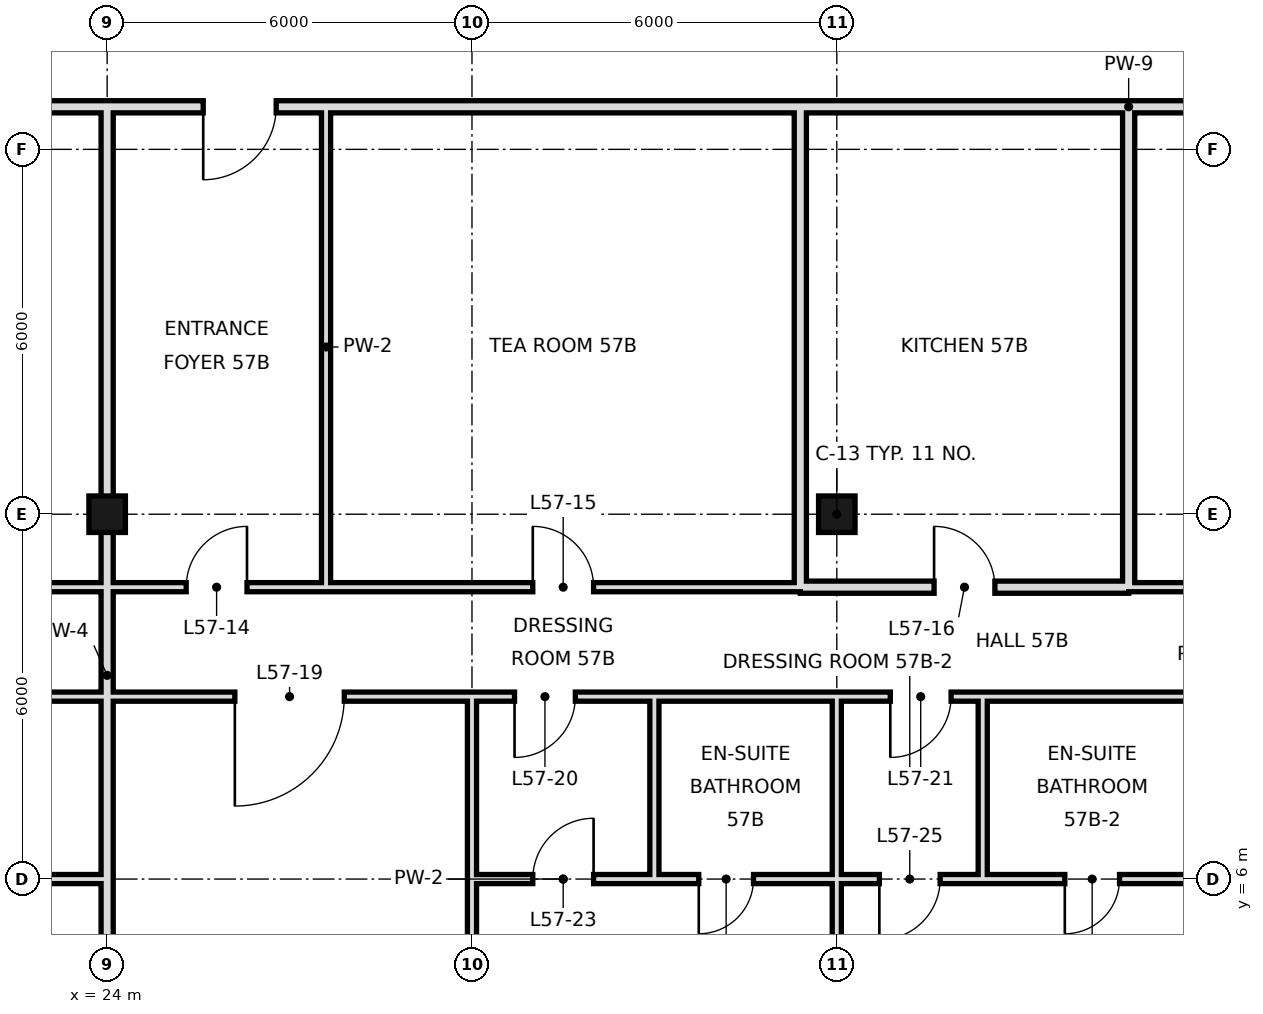
"""IFC4 building model, lengths in metres.
Left out: names, types, materials, properties, quantities, classifications, styles, units other than length and angle.
Written with IfcOpenShell. Run it as: python <this file> out.ifc"""

import sys

from ifc_helpers import new_model, si_unit, direction, frame, frame_2d, origin, origin_2d, place, context, subcontext, project, spatial, rectangle, hollow_rectangle, extrude, element, fill, save


model = new_model("IFC4")
c1 = context("Model", 3, precision=1e-05, world=origin(), true_north=direction((0.0, 1.0)))
c2 = subcontext(c1, "Body", "Model", "MODEL_VIEW")
j1 = project(units=[si_unit("LENGTHUNIT", "METRE"), si_unit("PLANEANGLEUNIT", "RADIAN")], contexts=[c1])
p1 = place(None, origin())
s1 = spatial("IfcSite", under=j1, at=p1, CompositionType="ELEMENT")
p2 = place(p1, origin())
s2 = spatial("IfcBuilding", under=s1, at=p2, CompositionType="ELEMENT")
p3 = place(p2, frame((0.0, 0.0, 243.2)))
s3 = spatial("IfcBuildingStorey", under=s2, at=p3, CompositionType="ELEMENT", Elevation=243.2)
for number, where, z_axis, x_axis in (
    (1, (24.0, 12.0, 0.0), (0.0, 0.0, 1.0), (1.0, 0.0, 0.0)),
    (2, (36.0, 12.0, 0.0), (0.0, 0.0, 1.0), (1.0, 0.0, 0.0)),
):
    element("IfcColumn", number, at=place(p3, frame(where, z_axis=z_axis, x_axis=x_axis)), inside=s3, PredefinedType="COLUMN", context=c2, shape_type="SweptSolid", body=[
        extrude(hollow_rectangle(XDim=0.6, YDim=0.6, WallThickness=0.028, at=origin_2d()), origin(), (0.0, 0.0, 1.0), 3.6),
    ])
p4 = place(p3, frame((24.0, 0.0, 0.0), z_axis=(0.0, 0.0, 1.0), x_axis=(0.0, 1.0, 0.0)))
e3 = element("IfcWall", 3, at=p4, inside=s3, PredefinedType="SOLIDWALL", context=c2, shape_type="SweptSolid", body=[
    extrude(rectangle(XDim=18.7, YDim=0.2, at=frame_2d((9.35, 0.0))), origin(), (0.0, 0.0, 1.0), 2.72),
])
p5 = place(p3, frame((27.6, 10.8, 0.0), z_axis=(0.0, 0.0, 1.0), x_axis=(0.0, 1.0, 0.0)))
e4 = element("IfcWall", 4, at=p5, inside=s3, PredefinedType="PARTITIONING", context=c2, shape_type="SweptSolid", body=[
    extrude(rectangle(XDim=7.9, YDim=0.15, at=frame_2d((3.95, 0.0))), origin(), (0.0, 0.0, 1.0), 3.42),
])
p6 = place(p3, frame((30.0, -0.6, 0.0), z_axis=(0.0, 0.0, 1.0), x_axis=(0.0, 1.0, 0.0)))
e5 = element("IfcWall", 5, at=p6, inside=s3, PredefinedType="PARTITIONING", context=c2, shape_type="SweptSolid", body=[
    extrude(rectangle(XDim=9.6, YDim=0.15, at=frame_2d((4.8, 0.0))), origin(), (0.0, 0.0, 1.0), 2.72),
])
p7 = place(p3, frame((33.0, 6.0, 0.0), z_axis=(0.0, 0.0, 1.0), x_axis=(0.0, 1.0, 0.0)))
e6 = element("IfcWall", 6, at=p7, inside=s3, PredefinedType="PARTITIONING", context=c2, shape_type="SweptSolid", body=[
    extrude(rectangle(XDim=3.0, YDim=0.15, at=frame_2d((1.5, 0.0))), origin(), (0.0, 0.0, 1.0), 3.42),
])
p8 = place(p3, frame((35.4, 10.8, 0.0), z_axis=(0.0, 0.0, 1.0), x_axis=(0.0, 1.0, 0.0)))
e7 = element("IfcWall", 7, at=p8, inside=s3, PredefinedType="SOLIDWALL", context=c2, shape_type="SweptSolid", body=[
    extrude(rectangle(XDim=7.9, YDim=0.2, at=frame_2d((3.95, 0.0))), origin(), (0.0, 0.0, 1.0), 2.72),
])
p9 = place(p3, frame((36.0, 0.0, 0.0), z_axis=(0.0, 0.0, 1.0), x_axis=(0.0, 1.0, 0.0)))
e8 = element("IfcWall", 8, at=p9, inside=s3, PredefinedType="PARTITIONING", context=c2, shape_type="SweptSolid", body=[
    extrude(rectangle(XDim=6.0, YDim=0.15, at=frame_2d((3.0, 0.0))), origin(), (0.0, 0.0, 1.0), 2.72),
])
p10 = place(p3, frame((36.0, 6.0, 0.0), z_axis=(0.0, 0.0, 1.0), x_axis=(0.0, 1.0, 0.0)))
e9 = element("IfcWall", 9, at=p10, inside=s3, PredefinedType="PARTITIONING", context=c2, shape_type="SweptSolid", body=[
    extrude(rectangle(XDim=3.0, YDim=0.15, at=frame_2d((1.5, 0.0))), origin(), (0.0, 0.0, 1.0), 2.72),
])
p11 = place(p3, frame((38.4, 6.0, 0.0), z_axis=(0.0, 0.0, 1.0), x_axis=(0.0, 1.0, 0.0)))
e10 = element("IfcWall", 10, at=p11, inside=s3, PredefinedType="PARTITIONING", context=c2, shape_type="SweptSolid", body=[
    extrude(rectangle(XDim=3.0, YDim=0.15, at=frame_2d((1.5, 0.0))), origin(), (0.0, 0.0, 1.0), 3.42),
])
p12 = place(p3, frame((40.8, 10.8, 0.0), z_axis=(0.0, 0.0, 1.0), x_axis=(0.0, 1.0, 0.0)))
e11 = element("IfcWall", 11, at=p12, inside=s3, PredefinedType="SOLIDWALL", context=c2, shape_type="SweptSolid", body=[
    extrude(rectangle(XDim=7.9, YDim=0.2, at=frame_2d((3.95, 0.0))), origin(), (0.0, 0.0, 1.0), 2.72),
])
p13 = place(p3, frame((35.4, 10.8, 0.0), z_axis=(0.0, 0.0, 1.0), x_axis=(1.0, 0.0, 0.0)))
e12 = element("IfcWall", 12, at=p13, inside=s3, PredefinedType="SOLIDWALL", context=c2, shape_type="SweptSolid", body=[
    extrude(rectangle(XDim=5.4, YDim=0.2, at=frame_2d((2.7, 0.0))), origin(), (0.0, 0.0, 1.0), 2.72),
])
p14 = place(p13, frame((2.2, 0.0, 0.0)))
e13 = element("IfcOpeningElement", 13, at=p14, cuts=e12, PredefinedType="OPENING", context=c2, shape_type="SweptSolid", body=[
    extrude(rectangle(XDim=1.0, YDim=2.4, at=frame_2d((0.5, 1.2))), frame((0.0, 0.11, 0.0), z_axis=(0.0, -1.0, 0.0), x_axis=(1.0, 0.0, 0.0)), (0.0, 0.0, 1.0), 0.22),
])
p15 = place(p3, frame((6.0, 10.8, 0.0), z_axis=(0.0, 0.0, 1.0), x_axis=(1.0, 0.0, 0.0)))
e14 = element("IfcWall", 14, at=p15, inside=s3, PredefinedType="PARTITIONING", context=c2, shape_type="SweptSolid", body=[
    extrude(rectangle(XDim=29.4, YDim=0.15, at=frame_2d((14.7, 0.0))), origin(), (0.0, 0.0, 1.0), 3.42),
])
p16 = place(p15, frame((3.4, 0.0, 0.0)))
e15 = element("IfcOpeningElement", 15, at=p16, cuts=e14, PredefinedType="OPENING", context=c2, shape_type="SweptSolid", body=[
    extrude(rectangle(XDim=1.0, YDim=2.4, at=frame_2d((0.5, 1.2))), frame((0.0, 0.085, 0.0), z_axis=(0.0, -1.0, 0.0), x_axis=(1.0, 0.0, 0.0)), (0.0, 0.0, 1.0), 0.17),
])
p17 = place(p15, frame((9.4, 0.0, 0.0)))
e16 = element("IfcOpeningElement", 16, at=p17, cuts=e14, PredefinedType="OPENING", context=c2, shape_type="SweptSolid", body=[
    extrude(rectangle(XDim=1.0, YDim=2.4, at=frame_2d((0.5, 1.2))), frame((0.0, 0.085, 0.0), z_axis=(0.0, -1.0, 0.0), x_axis=(1.0, 0.0, 0.0)), (0.0, 0.0, 1.0), 0.17),
])
p18 = place(p15, frame((19.3, 0.0, 0.0)))
e17 = element("IfcOpeningElement", 17, at=p18, cuts=e14, PredefinedType="OPENING", context=c2, shape_type="SweptSolid", body=[
    extrude(rectangle(XDim=1.0, YDim=2.4, at=frame_2d((0.5, 1.2))), frame((0.0, 0.085, 0.0), z_axis=(0.0, -1.0, 0.0), x_axis=(1.0, 0.0, 0.0)), (0.0, 0.0, 1.0), 0.17),
])
p19 = place(p15, frame((25.0, 0.0, 0.0)))
e18 = element("IfcOpeningElement", 18, at=p19, cuts=e14, PredefinedType="OPENING", context=c2, shape_type="SweptSolid", body=[
    extrude(rectangle(XDim=1.0, YDim=2.4, at=frame_2d((0.5, 1.2))), frame((0.0, 0.085, 0.0), z_axis=(0.0, -1.0, 0.0), x_axis=(1.0, 0.0, 0.0)), (0.0, 0.0, 1.0), 0.17),
])
p20 = place(p3, frame((40.8, 10.8, 0.0), z_axis=(0.0, 0.0, 1.0), x_axis=(1.0, 0.0, 0.0)))
e19 = element("IfcWall", 19, at=p20, inside=s3, PredefinedType="PARTITIONING", context=c2, shape_type="SweptSolid", body=[
    extrude(rectangle(XDim=10.8, YDim=0.15, at=frame_2d((5.4, 0.0))), origin(), (0.0, 0.0, 1.0), 3.42),
])
p21 = place(p20, frame((4.9, 0.0, 0.0)))
e20 = element("IfcOpeningElement", 20, at=p21, cuts=e19, PredefinedType="OPENING", context=c2, shape_type="SweptSolid", body=[
    extrude(rectangle(XDim=1.0, YDim=2.4, at=frame_2d((0.5, 1.2))), frame((0.0, 0.085, 0.0), z_axis=(0.0, -1.0, 0.0), x_axis=(1.0, 0.0, 0.0)), (0.0, 0.0, 1.0), 0.17),
])
p22 = place(p3, frame((6.0, 18.7, 0.0), z_axis=(0.0, 0.0, 1.0), x_axis=(1.0, 0.0, 0.0)))
e21 = element("IfcWall", 21, at=p22, inside=s3, PredefinedType="SOLIDWALL", context=c2, shape_type="SweptSolid", body=[
    extrude(rectangle(XDim=29.4, YDim=0.2, at=frame_2d((14.7, 0.0))), origin(), (0.0, 0.0, 1.0), 2.72),
])
p23 = place(p22, frame((1.54, 0.0, 0.0)))
e22 = element("IfcOpeningElement", 22, at=p23, cuts=e21, PredefinedType="OPENING", context=c2, shape_type="SweptSolid", body=[
    extrude(rectangle(XDim=1.2, YDim=2.4, at=frame_2d((0.6, 1.2))), frame((0.0, 0.11, 0.0), z_axis=(0.0, -1.0, 0.0), x_axis=(1.0, 0.0, 0.0)), (0.0, 0.0, 1.0), 0.22),
])
p24 = place(p22, frame((19.58, 0.0, 0.0)))
e23 = element("IfcOpeningElement", 23, at=p24, cuts=e21, PredefinedType="OPENING", context=c2, shape_type="SweptSolid", body=[
    extrude(rectangle(XDim=1.2, YDim=2.4, at=frame_2d((0.6, 1.2))), frame((0.0, 0.11, 0.0), z_axis=(0.0, -1.0, 0.0), x_axis=(1.0, 0.0, 0.0)), (0.0, 0.0, 1.0), 0.22),
])
p25 = place(p3, frame((40.8, 18.7, 0.0), z_axis=(0.0, 0.0, 1.0), x_axis=(1.0, 0.0, 0.0)))
e24 = element("IfcWall", 24, at=p25, inside=s3, PredefinedType="SOLIDWALL", context=c2, shape_type="SweptSolid", body=[
    extrude(rectangle(XDim=4.1, YDim=0.2, at=frame_2d((2.05, 0.0))), origin(), (0.0, 0.0, 1.0), 2.72),
])
p26 = place(p3, frame((35.4, 18.7, 0.0), z_axis=(0.0, 0.0, 1.0), x_axis=(1.0, 0.0, 0.0)))
e25 = element("IfcWall", 25, at=p26, inside=s3, PredefinedType="SOLIDWALL", context=c2, shape_type="SweptSolid", body=[
    extrude(rectangle(XDim=5.4, YDim=0.2, at=frame_2d((2.7, 0.0))), origin(), (0.0, 0.0, 1.0), 3.42),
])
p27 = place(p3, frame((12.0, 6.0, 0.0), z_axis=(0.0, 0.0, 1.0), x_axis=(1.0, 0.0, 0.0)))
e26 = element("IfcWall", 26, at=p27, inside=s3, PredefinedType="PARTITIONING", context=c2, shape_type="SweptSolid", body=[
    extrude(rectangle(XDim=12.0, YDim=0.15, at=frame_2d((6.0, 0.0))), origin(), (0.0, 0.0, 1.0), 2.97),
])
p28 = place(p27, frame((0.25, 0.0, 0.0)))
e27 = element("IfcOpeningElement", 27, at=p28, cuts=e26, PredefinedType="OPENING", context=c2, shape_type="SweptSolid", body=[
    extrude(rectangle(XDim=1.8, YDim=2.4, at=frame_2d((0.9, 1.2))), frame((0.0, 0.085, 0.0), z_axis=(0.0, -1.0, 0.0), x_axis=(1.0, 0.0, 0.0)), (0.0, 0.0, 1.0), 0.17),
])
p29 = place(p3, frame((30.0, 6.0, 0.0), z_axis=(0.0, 0.0, 1.0), x_axis=(1.0, 0.0, 0.0)))
e28 = element("IfcWall", 28, at=p29, inside=s3, PredefinedType="PARTITIONING", context=c2, shape_type="SweptSolid", body=[
    extrude(rectangle(XDim=3.0, YDim=0.15, at=frame_2d((1.5, 0.0))), origin(), (0.0, 0.0, 1.0), 2.97),
])
p30 = place(p29, frame((1.0, 0.0, 0.0)))
e29 = element("IfcOpeningElement", 29, at=p30, cuts=e28, PredefinedType="OPENING", context=c2, shape_type="SweptSolid", body=[
    extrude(rectangle(XDim=1.0, YDim=2.4, at=frame_2d((0.5, 1.2))), frame((0.0, 0.085, 0.0), z_axis=(0.0, -1.0, 0.0), x_axis=(1.0, 0.0, 0.0)), (0.0, 0.0, 1.0), 0.17),
])
p31 = place(p3, frame((36.0, 6.0, 0.0), z_axis=(0.0, 0.0, 1.0), x_axis=(1.0, 0.0, 0.0)))
e30 = element("IfcWall", 30, at=p31, inside=s3, PredefinedType="PARTITIONING", context=c2, shape_type="SweptSolid", body=[
    extrude(rectangle(XDim=2.4, YDim=0.15, at=frame_2d((1.2, 0.0))), origin(), (0.0, 0.0, 1.0), 2.97),
])
p32 = place(p31, frame((0.7, 0.0, 0.0)))
e31 = element("IfcOpeningElement", 31, at=p32, cuts=e30, PredefinedType="OPENING", context=c2, shape_type="SweptSolid", body=[
    extrude(rectangle(XDim=1.0, YDim=2.4, at=frame_2d((0.5, 1.2))), frame((0.0, 0.085, 0.0), z_axis=(0.0, -1.0, 0.0), x_axis=(1.0, 0.0, 0.0)), (0.0, 0.0, 1.0), 0.17),
])
p33 = place(p3, frame((33.0, 6.0, 0.0), z_axis=(0.0, 0.0, 1.0), x_axis=(1.0, 0.0, 0.0)))
e32 = element("IfcWall", 32, at=p33, inside=s3, PredefinedType="PARTITIONING", context=c2, shape_type="SweptSolid", body=[
    extrude(rectangle(XDim=3.0, YDim=0.15, at=frame_2d((1.5, 0.0))), origin(), (0.0, 0.0, 1.0), 2.97),
])
p34 = place(p33, frame((0.73, 0.0, 0.0)))
e33 = element("IfcOpeningElement", 33, at=p34, cuts=e32, PredefinedType="OPENING", context=c2, shape_type="SweptSolid", body=[
    extrude(rectangle(XDim=0.9, YDim=2.4, at=frame_2d((0.45, 1.2))), frame((0.0, 0.085, 0.0), z_axis=(0.0, -1.0, 0.0), x_axis=(1.0, 0.0, 0.0)), (0.0, 0.0, 1.0), 0.17),
])
p35 = place(p3, frame((38.4, 6.0, 0.0), z_axis=(0.0, 0.0, 1.0), x_axis=(1.0, 0.0, 0.0)))
e34 = element("IfcWall", 34, at=p35, inside=s3, PredefinedType="PARTITIONING", context=c2, shape_type="SweptSolid", body=[
    extrude(rectangle(XDim=3.6, YDim=0.15, at=frame_2d((1.8, 0.0))), origin(), (0.0, 0.0, 1.0), 2.97),
])
p36 = place(p35, frame((1.35, 0.0, 0.0)))
e35 = element("IfcOpeningElement", 35, at=p36, cuts=e34, PredefinedType="OPENING", context=c2, shape_type="SweptSolid", body=[
    extrude(rectangle(XDim=0.9, YDim=2.4, at=frame_2d((0.45, 1.2))), frame((0.0, 0.085, 0.0), z_axis=(0.0, -1.0, 0.0), x_axis=(1.0, 0.0, 0.0)), (0.0, 0.0, 1.0), 0.17),
])
p37 = place(p3, frame((0.0, 9.0, 0.0), z_axis=(0.0, 0.0, 1.0), x_axis=(1.0, 0.0, 0.0)))
e36 = element("IfcWall", 36, at=p37, inside=s3, PredefinedType="PARTITIONING", context=c2, shape_type="SweptSolid", body=[
    extrude(rectangle(XDim=33.0, YDim=0.15, at=frame_2d((16.5, 0.0))), origin(), (0.0, 0.0, 1.0), 3.42),
])
p38 = place(p37, frame((1.6, 0.0, 0.0)))
e37 = element("IfcOpeningElement", 37, at=p38, cuts=e36, PredefinedType="OPENING", context=c2, shape_type="SweptSolid", body=[
    extrude(rectangle(XDim=1.0, YDim=2.4, at=frame_2d((0.5, 1.2))), frame((0.0, 0.085, 0.0), z_axis=(0.0, -1.0, 0.0), x_axis=(1.0, 0.0, 0.0)), (0.0, 0.0, 1.0), 0.17),
])
p39 = place(p37, frame((9.4, 0.0, 0.0)))
e38 = element("IfcOpeningElement", 38, at=p39, cuts=e36, PredefinedType="OPENING", context=c2, shape_type="SweptSolid", body=[
    extrude(rectangle(XDim=1.0, YDim=2.4, at=frame_2d((0.5, 1.2))), frame((0.0, 0.085, 0.0), z_axis=(0.0, -1.0, 0.0), x_axis=(1.0, 0.0, 0.0)), (0.0, 0.0, 1.0), 0.17),
])
p40 = place(p37, frame((15.16, 0.0, 0.0)))
e39 = element("IfcOpeningElement", 39, at=p40, cuts=e36, PredefinedType="OPENING", context=c2, shape_type="SweptSolid", body=[
    extrude(rectangle(XDim=1.8, YDim=2.4, at=frame_2d((0.9, 1.2))), frame((0.0, 0.085, 0.0), z_axis=(0.0, -1.0, 0.0), x_axis=(1.0, 0.0, 0.0)), (0.0, 0.0, 1.0), 0.17),
])
p41 = place(p37, frame((26.1, 0.0, 0.0)))
e40 = element("IfcOpeningElement", 40, at=p41, cuts=e36, PredefinedType="OPENING", context=c2, shape_type="SweptSolid", body=[
    extrude(rectangle(XDim=1.8, YDim=2.4, at=frame_2d((0.9, 1.2))), frame((0.0, 0.085, 0.0), z_axis=(0.0, -1.0, 0.0), x_axis=(1.0, 0.0, 0.0)), (0.0, 0.0, 1.0), 0.17),
])
p42 = place(p37, frame((30.7, 0.0, 0.0)))
e41 = element("IfcOpeningElement", 41, at=p42, cuts=e36, PredefinedType="OPENING", context=c2, shape_type="SweptSolid", body=[
    extrude(rectangle(XDim=1.0, YDim=2.4, at=frame_2d((0.5, 1.2))), frame((0.0, 0.085, 0.0), z_axis=(0.0, -1.0, 0.0), x_axis=(1.0, 0.0, 0.0)), (0.0, 0.0, 1.0), 0.17),
])
p43 = place(p3, frame((36.0, 9.0, 0.0), z_axis=(0.0, 0.0, 1.0), x_axis=(1.0, 0.0, 0.0)))
e42 = element("IfcWall", 42, at=p43, inside=s3, PredefinedType="PARTITIONING", context=c2, shape_type="SweptSolid", body=[
    extrude(rectangle(XDim=2.4, YDim=0.15, at=frame_2d((1.2, 0.0))), origin(), (0.0, 0.0, 1.0), 3.42),
])
p44 = place(p43, frame((0.88, 0.0, 0.0)))
e43 = element("IfcOpeningElement", 43, at=p44, cuts=e42, PredefinedType="OPENING", context=c2, shape_type="SweptSolid", body=[
    extrude(rectangle(XDim=1.0, YDim=2.4, at=frame_2d((0.5, 1.2))), frame((0.0, 0.085, 0.0), z_axis=(0.0, -1.0, 0.0), x_axis=(1.0, 0.0, 0.0)), (0.0, 0.0, 1.0), 0.17),
])
p45 = place(p3, frame((33.0, 9.0, 0.0), z_axis=(0.0, 0.0, 1.0), x_axis=(1.0, 0.0, 0.0)))
e44 = element("IfcWall", 44, at=p45, inside=s3, PredefinedType="PARTITIONING", context=c2, shape_type="SweptSolid", body=[
    extrude(rectangle(XDim=3.0, YDim=0.15, at=frame_2d((1.5, 0.0))), origin(), (0.0, 0.0, 1.0), 3.42),
])
p46 = place(p3, frame((38.4, 9.0, 0.0), z_axis=(0.0, 0.0, 1.0), x_axis=(1.0, 0.0, 0.0)))
e45 = element("IfcWall", 45, at=p46, inside=s3, PredefinedType="PARTITIONING", context=c2, shape_type="SweptSolid", body=[
    extrude(rectangle(XDim=3.6, YDim=0.15, at=frame_2d((1.8, 0.0))), origin(), (0.0, 0.0, 1.0), 3.42),
])
p47 = place(p18, frame((1.0, 0.0, 0.0), z_axis=(0.0, 0.0, 1.0), x_axis=(-1.0, 0.0, 0.0)))
e46 = element("IfcDoor", 46, at=p47, inside=s3, OperationType="SINGLE_SWING_LEFT", PredefinedType="DOOR", context=c2, shape_type="SweptSolid", body=[
    extrude(rectangle(XDim=1.0, YDim=2.4, at=frame_2d((0.5, 1.2))), frame((0.0, 0.025, 0.0), z_axis=(0.0, -1.0, 0.0), x_axis=(1.0, 0.0, 0.0)), (0.0, 0.0, 1.0), 0.05),
])
fill(e17, e46)
p48 = place(p19, origin())
e47 = element("IfcDoor", 47, at=p48, inside=s3, OperationType="SINGLE_SWING_LEFT", PredefinedType="DOOR", context=c2, shape_type="SweptSolid", body=[
    extrude(rectangle(XDim=1.0, YDim=2.4, at=frame_2d((0.5, 1.2))), frame((0.0, 0.025, 0.0), z_axis=(0.0, -1.0, 0.0), x_axis=(1.0, 0.0, 0.0)), (0.0, 0.0, 1.0), 0.05),
])
fill(e18, e47)
p49 = place(p14, origin())
e48 = element("IfcDoor", 48, at=p49, inside=s3, OperationType="SINGLE_SWING_LEFT", PredefinedType="DOOR", context=c2, shape_type="SweptSolid", body=[
    extrude(rectangle(XDim=1.0, YDim=2.4, at=frame_2d((0.5, 1.2))), frame((0.0, 0.025, 0.0), z_axis=(0.0, -1.0, 0.0), x_axis=(1.0, 0.0, 0.0)), (0.0, 0.0, 1.0), 0.05),
])
fill(e13, e48)
p50 = place(p41, frame((1.8, 0.0, 0.0), z_axis=(0.0, 0.0, 1.0), x_axis=(-1.0, 0.0, 0.0)))
e49 = element("IfcDoor", 49, at=p50, inside=s3, OperationType="SINGLE_SWING_RIGHT", PredefinedType="DOOR", context=c2, shape_type="SweptSolid", body=[
    extrude(rectangle(XDim=1.8, YDim=2.4, at=frame_2d((0.9, 1.2))), frame((0.0, 0.025, 0.0), z_axis=(0.0, -1.0, 0.0), x_axis=(1.0, 0.0, 0.0)), (0.0, 0.0, 1.0), 0.05),
])
fill(e40, e49)
p51 = place(p42, frame((1.0, 0.0, 0.0), z_axis=(0.0, 0.0, 1.0), x_axis=(-1.0, 0.0, 0.0)))
e50 = element("IfcDoor", 50, at=p51, inside=s3, OperationType="SINGLE_SWING_RIGHT", PredefinedType="DOOR", context=c2, shape_type="SweptSolid", body=[
    extrude(rectangle(XDim=1.0, YDim=2.4, at=frame_2d((0.5, 1.2))), frame((0.0, 0.025, 0.0), z_axis=(0.0, -1.0, 0.0), x_axis=(1.0, 0.0, 0.0)), (0.0, 0.0, 1.0), 0.05),
])
fill(e41, e50)
p52 = place(p44, frame((1.0, 0.0, 0.0), z_axis=(0.0, 0.0, 1.0), x_axis=(-1.0, 0.0, 0.0)))
e51 = element("IfcDoor", 51, at=p52, inside=s3, OperationType="SINGLE_SWING_RIGHT", PredefinedType="DOOR", context=c2, shape_type="SweptSolid", body=[
    extrude(rectangle(XDim=1.0, YDim=2.4, at=frame_2d((0.5, 1.2))), frame((0.0, 0.025, 0.0), z_axis=(0.0, -1.0, 0.0), x_axis=(1.0, 0.0, 0.0)), (0.0, 0.0, 1.0), 0.05),
])
fill(e43, e51)
p53 = place(p30, frame((1.0, 0.0, 0.0), z_axis=(0.0, 0.0, 1.0), x_axis=(-1.0, 0.0, 0.0)))
e52 = element("IfcDoor", 52, at=p53, inside=s3, OperationType="SINGLE_SWING_LEFT", PredefinedType="DOOR", context=c2, shape_type="SweptSolid", body=[
    extrude(rectangle(XDim=1.0, YDim=2.4, at=frame_2d((0.5, 1.2))), frame((0.0, 0.025, 0.0), z_axis=(0.0, -1.0, 0.0), x_axis=(1.0, 0.0, 0.0)), (0.0, 0.0, 1.0), 0.05),
])
fill(e29, e52)
p54 = place(p34, frame((0.9, 0.0, 0.0), z_axis=(0.0, 0.0, 1.0), x_axis=(-1.0, 0.0, 0.0)))
e53 = element("IfcDoor", 53, at=p54, inside=s3, OperationType="SINGLE_SWING_RIGHT", PredefinedType="DOOR", context=c2, shape_type="SweptSolid", body=[
    extrude(rectangle(XDim=0.9, YDim=2.4, at=frame_2d((0.45, 1.2))), frame((0.0, 0.025, 0.0), z_axis=(0.0, -1.0, 0.0), x_axis=(1.0, 0.0, 0.0)), (0.0, 0.0, 1.0), 0.05),
])
fill(e33, e53)
p55 = place(p32, frame((1.0, 0.0, 0.0), z_axis=(0.0, 0.0, 1.0), x_axis=(-1.0, 0.0, 0.0)))
e54 = element("IfcDoor", 54, at=p55, inside=s3, OperationType="SINGLE_SWING_RIGHT", PredefinedType="DOOR", context=c2, shape_type="SweptSolid", body=[
    extrude(rectangle(XDim=1.0, YDim=2.4, at=frame_2d((0.5, 1.2))), frame((0.0, 0.025, 0.0), z_axis=(0.0, -1.0, 0.0), x_axis=(1.0, 0.0, 0.0)), (0.0, 0.0, 1.0), 0.05),
])
fill(e31, e54)
p56 = place(p36, frame((0.9, 0.0, 0.0), z_axis=(0.0, 0.0, 1.0), x_axis=(-1.0, 0.0, 0.0)))
e55 = element("IfcDoor", 55, at=p56, inside=s3, OperationType="SINGLE_SWING_RIGHT", PredefinedType="DOOR", context=c2, shape_type="SweptSolid", body=[
    extrude(rectangle(XDim=0.9, YDim=2.4, at=frame_2d((0.45, 1.2))), frame((0.0, 0.025, 0.0), z_axis=(0.0, -1.0, 0.0), x_axis=(1.0, 0.0, 0.0)), (0.0, 0.0, 1.0), 0.05),
])
fill(e35, e55)
p57 = place(p24, frame((1.2, 0.0, 0.0), z_axis=(0.0, 0.0, 1.0), x_axis=(-1.0, 0.0, 0.0)))
e56 = element("IfcDoor", 56, at=p57, inside=s3, OperationType="SINGLE_SWING_RIGHT", PredefinedType="DOOR", context=c2, shape_type="SweptSolid", body=[
    extrude(rectangle(XDim=1.2, YDim=2.4, at=frame_2d((0.6, 1.2))), frame((0.0, 0.025, 0.0), z_axis=(0.0, -1.0, 0.0), x_axis=(1.0, 0.0, 0.0)), (0.0, 0.0, 1.0), 0.05),
])
fill(e23, e56)
save(model, sys.argv[1])
